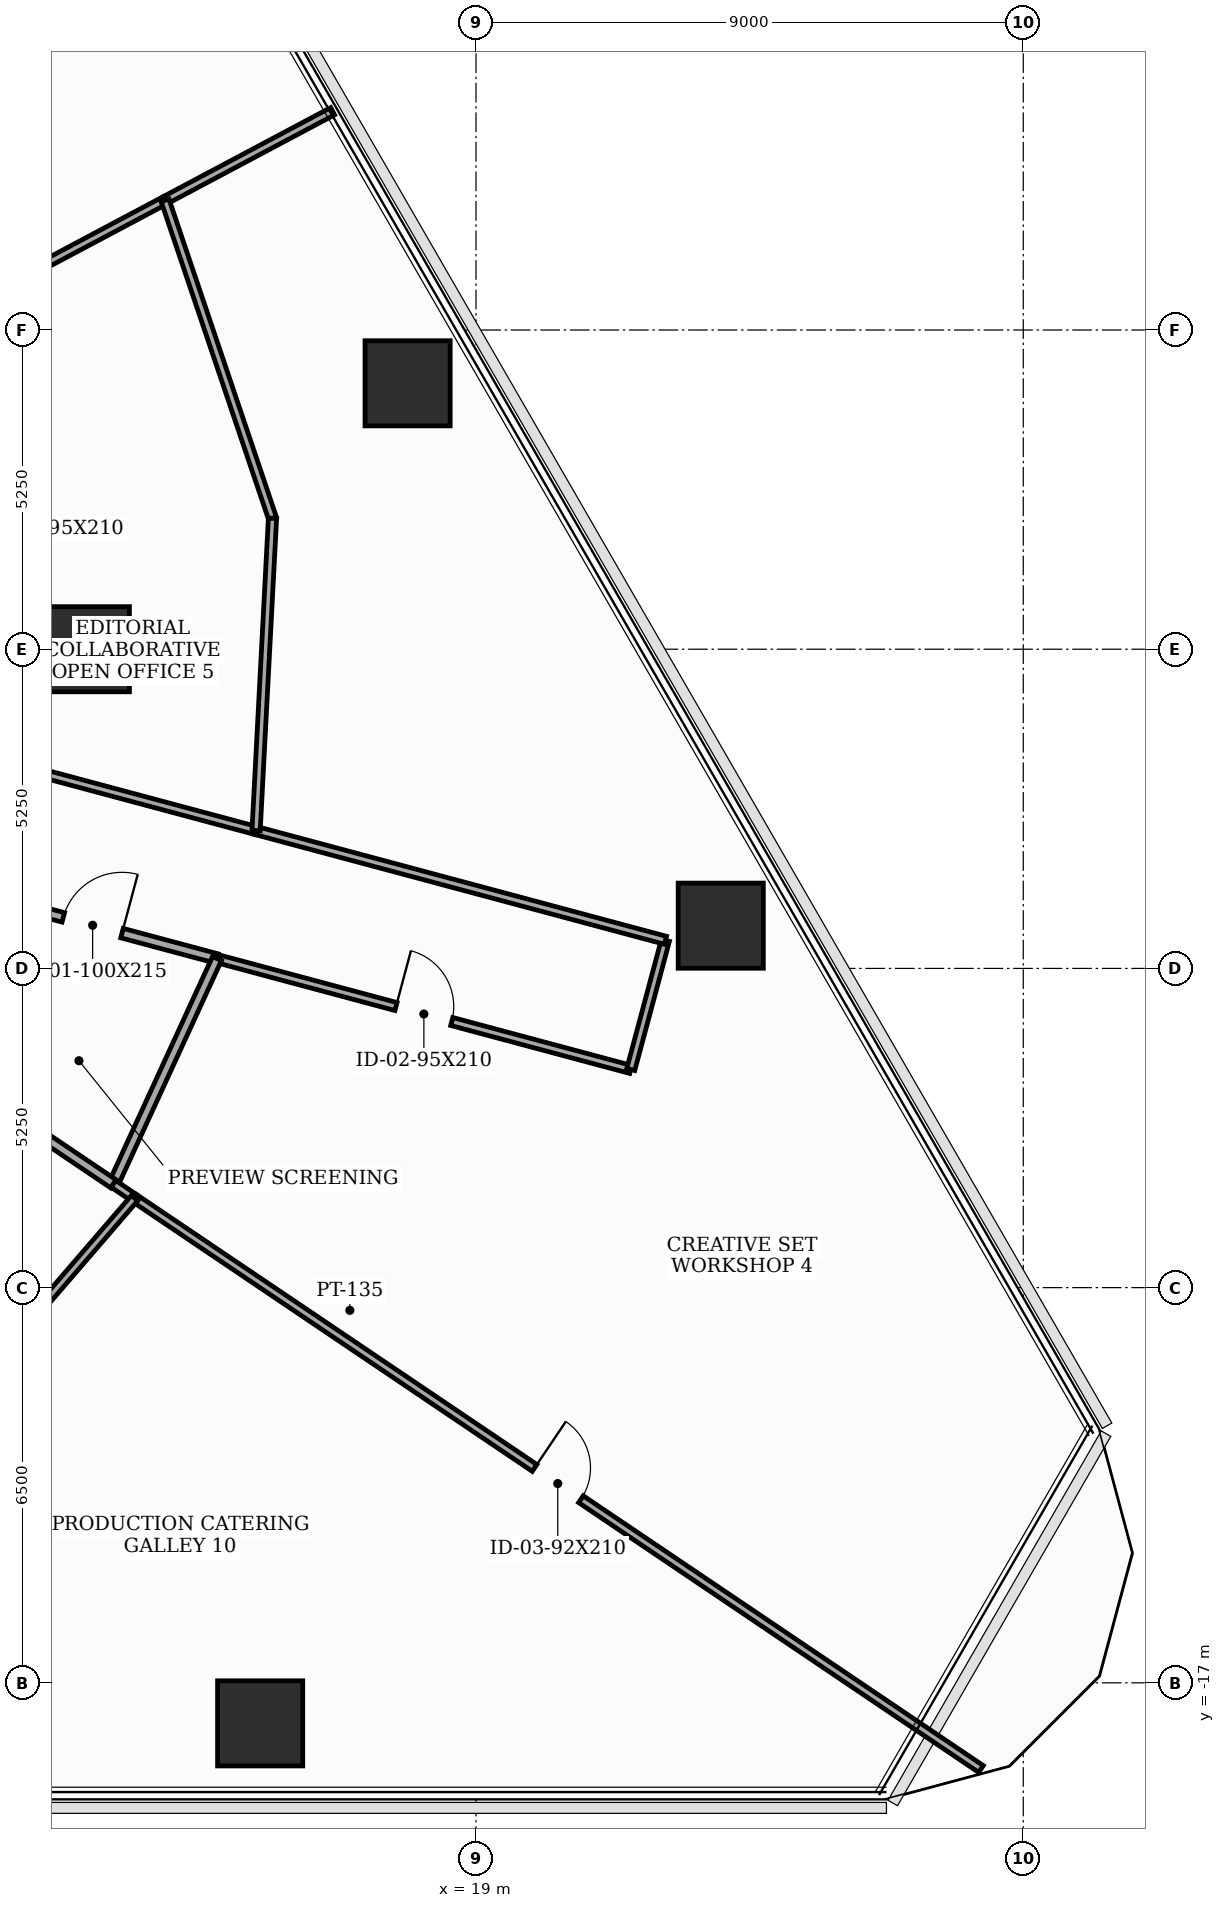
"""IFC4 building model, lengths in metres.
Left out: names, types, materials, properties, quantities, classifications, styles, units other than length and angle.
Written with IfcOpenShell. Run it as: python <this file> out.ifc"""

import sys

from ifc_helpers import new_model, si_unit, direction, frame, frame_2d, origin, origin_2d, place, context, subcontext, project, spatial, rectangle, extrude, element, fill, save


model = new_model("IFC4")
c1 = context("Model", 3, precision=1e-05, world=origin(), true_north=direction((0.0, 1.0)))
c2 = subcontext(c1, "Body", "Model", "MODEL_VIEW")
j1 = project(units=[si_unit("LENGTHUNIT", "METRE"), si_unit("PLANEANGLEUNIT", "RADIAN")], contexts=[c1])
p1 = place(None, origin())
s1 = spatial("IfcSite", under=j1, at=p1, CompositionType="ELEMENT")
p2 = place(p1, origin())
s2 = spatial("IfcBuilding", under=s1, at=p2, CompositionType="ELEMENT")
p3 = place(p2, frame((0.0, 0.0, 44.5)))
s3 = spatial("IfcBuildingStorey", under=s2, at=p3, CompositionType="ELEMENT", Elevation=44.5)
for number, where, z_axis, x_axis in (
    (1, (12.6, 0.0, 0.0), (0.0, 0.0, 1.0), (1.0, 0.0, 0.0)),
    (2, (15.45, -17.667, 0.0), (0.0, 0.0, 1.0), (1.0, 0.0, 0.0)),
    (3, (23.025, -4.547, 0.0), (0.0, 0.0, 1.0), (1.0, 0.0, 0.0)),
    (4, (17.875, 4.373, 0.0), (0.0, 0.0, 1.0), (1.0, 0.0, 0.0)),
):
    element("IfcColumn", number, at=place(p3, frame(where, z_axis=z_axis, x_axis=x_axis)), inside=s3, PredefinedType="COLUMN", context=c2, shape_type="SweptSolid", body=[
        extrude(rectangle(XDim=1.4, YDim=1.4, at=origin_2d()), origin(), (0.0, 0.0, 1.0), 3.7),
    ])
p4 = place(p3, frame((10.65, -3.992, 0.0), z_axis=(0.0, 0.0, 1.0), x_axis=(0.965925146235, -0.258821583086, 0.0)))
e5 = element("IfcWall", 5, at=p4, inside=s3, PredefinedType="PARTITIONING", context=c2, shape_type="SweptSolid", body=[
    extrude(rectangle(XDim=4.234, YDim=0.16, at=frame_2d((2.117, 0.0))), origin(), (0.0, 0.0, 1.0), 2.785),
])
p5 = place(p4, frame((1.617, 0.0, 0.0)))
e6 = element("IfcOpeningElement", 6, at=p5, cuts=e5, PredefinedType="OPENING", context=c2, shape_type="SweptSolid", body=[
    extrude(rectangle(XDim=1.0, YDim=2.15, at=frame_2d((0.5, 1.075))), frame((0.0, 0.09, 0.0), z_axis=(0.0, -1.0, 0.0), x_axis=(1.0, 0.0, 0.0)), (0.0, 0.0, 1.0), 0.18),
])
p6 = place(p3, frame((14.74, -5.088, 0.0), z_axis=(0.0, 0.0, 1.0), x_axis=(0.965895912523, -0.258930659002, 0.0)))
e7 = element("IfcWall", 7, at=p6, inside=s3, PredefinedType="PARTITIONING", context=c2, shape_type="SweptSolid", body=[
    extrude(rectangle(XDim=7.045, YDim=0.135, at=frame_2d((3.522, 0.0))), origin(), (0.0, 0.0, 1.0), 2.935),
])
p7 = place(p6, frame((3.048, 0.0, 0.0)))
e8 = element("IfcOpeningElement", 8, at=p7, cuts=e7, PredefinedType="OPENING", context=c2, shape_type="SweptSolid", body=[
    extrude(rectangle(XDim=0.95, YDim=2.1, at=frame_2d((0.475, 1.05))), frame((0.0, 0.077, 0.0), z_axis=(0.0, -1.0, 0.0), x_axis=(1.0, 0.0, 0.0)), (0.0, 0.0, 1.0), 0.155),
])
p8 = place(p3, frame((21.545, -6.912, 0.0), z_axis=(0.0, 0.0, 1.0), x_axis=(0.259105843213, 0.965848933329, 0.0)))
e9 = element("IfcWall", 9, at=p8, inside=s3, PredefinedType="PARTITIONING", context=c2, shape_type="SweptSolid", body=[
    extrude(rectangle(XDim=2.2, YDim=0.135, at=frame_2d((1.1, 0.0))), origin(), (0.0, 0.0, 1.0), 2.935),
])
p9 = place(p3, frame((22.115, -4.787, 0.0), z_axis=(0.0, 0.0, 1.0), x_axis=(-0.965912084765, 0.258870323726, 0.0)))
e10 = element("IfcWall", 10, at=p9, inside=s3, PredefinedType="PARTITIONING", context=c2, shape_type="SweptSolid", body=[
    extrude(rectangle(XDim=6.969, YDim=0.135, at=frame_2d((3.485, 0.0))), origin(), (0.0, 0.0, 1.0), 3.085),
])
p10 = place(p3, frame((15.383, -2.983, 0.0), z_axis=(0.0, 0.0, 1.0), x_axis=(-0.965947384406, 0.258738575706, 0.0)))
e11 = element("IfcWall", 11, at=p10, inside=s3, PredefinedType="PARTITIONING", context=c2, shape_type="SweptSolid", body=[
    extrude(rectangle(XDim=4.9, YDim=0.135, at=frame_2d((2.45, 0.0))), origin(), (0.0, 0.0, 1.0), 2.785),
])
p11 = place(p3, frame((13.886, 7.383, 0.0), z_axis=(0.0, 0.0, 1.0), x_axis=(0.88293033741, 0.469504014126, 0.0)))
e12 = element("IfcWall", 12, at=p11, inside=s3, PredefinedType="PARTITIONING", context=c2, shape_type="SweptSolid", body=[
    extrude(rectangle(XDim=3.122, YDim=0.135, at=frame_2d((1.561, 0.0))), origin(), (0.0, 0.0, 1.0), 2.935),
])
p12 = place(p3, frame((10.65, 5.663, 0.0), z_axis=(0.0, 0.0, 1.0), x_axis=(0.88302513666, 0.469325695041, 0.0)))
e13 = element("IfcWall", 13, at=p12, inside=s3, PredefinedType="PARTITIONING", context=c2, shape_type="SweptSolid", body=[
    extrude(rectangle(XDim=3.665, YDim=0.135, at=frame_2d((1.833, 0.0))), origin(), (0.0, 0.0, 1.0), 2.785),
])
p13 = place(p3, frame((13.038, -8.794, 0.0), z_axis=(0.0, 0.0, 1.0), x_axis=(0.417322480709, 0.908758464662, 0.0)))
e14 = element("IfcWall", 14, at=p13, inside=s3, PredefinedType="PARTITIONING", context=c2, shape_type="SweptSolid", body=[
    extrude(rectangle(XDim=4.078, YDim=0.16, at=frame_2d((2.039, 0.0))), origin(), (0.0, 0.0, 1.0), 3.5),
])
p14 = place(p3, frame((10.65, -7.184, 0.0), z_axis=(0.0, 0.0, 1.0), x_axis=(0.829196392101, -0.558957371654, 0.0)))
e15 = element("IfcWall", 15, at=p14, inside=s3, PredefinedType="PARTITIONING", context=c2, shape_type="SweptSolid", body=[
    extrude(rectangle(XDim=2.88, YDim=0.16, at=frame_2d((1.44, 0.0))), origin(), (0.0, 0.0, 1.0), 3.5),
])
p15 = place(p3, frame((13.886, 7.383, 0.0), z_axis=(0.0, 0.0, 1.0), x_axis=(0.320099223205, -0.947384023141, 0.0)))
e16 = element("IfcWall", 16, at=p15, inside=s3, PredefinedType="PARTITIONING", context=c2, shape_type="SweptSolid", body=[
    extrude(rectangle(XDim=5.521, YDim=0.135, at=frame_2d((2.76, 0.0))), origin(), (0.0, 0.0, 1.0), 2.685),
])
p16 = place(p3, frame((15.653, 2.153, 0.0), z_axis=(0.0, 0.0, 1.0), x_axis=(-0.05250152841, -0.998620843721, 0.0)))
e17 = element("IfcWall", 17, at=p16, inside=s3, PredefinedType="PARTITIONING", context=c2, shape_type="SweptSolid", body=[
    extrude(rectangle(XDim=5.143, YDim=0.135, at=frame_2d((2.572, 0.0))), origin(), (0.0, 0.0, 1.0), 2.685),
])
p17 = place(p3, frame((13.038, -8.794, 0.0), z_axis=(0.0, 0.0, 1.0), x_axis=(0.828163729679, -0.560486250361, 0.0)))
e18 = element("IfcWall", 18, at=p17, inside=s3, PredefinedType="PARTITIONING", context=c2, shape_type="SweptSolid", body=[
    extrude(rectangle(XDim=0.418, YDim=0.135, at=frame_2d((0.209, 0.0))), origin(), (0.0, 0.0, 1.0), 3.5),
])
p18 = place(p3, frame((13.384, -9.028, 0.0), z_axis=(0.0, 0.0, 1.0), x_axis=(0.829042972493, -0.55918489765, 0.0)))
e19 = element("IfcWall", 19, at=p18, inside=s3, PredefinedType="PARTITIONING", context=c2, shape_type="SweptSolid", body=[
    extrude(rectangle(XDim=16.791, YDim=0.135, at=frame_2d((8.396, 0.0))), origin(), (0.0, 0.0, 1.0), 2.935),
])
p19 = place(p18, frame((7.936, 0.0, 0.0)))
e20 = element("IfcOpeningElement", 20, at=p19, cuts=e19, PredefinedType="OPENING", context=c2, shape_type="SweptSolid", body=[
    extrude(rectangle(XDim=0.92, YDim=2.1, at=frame_2d((0.46, 1.05))), frame((0.0, 0.077, 0.0), z_axis=(0.0, -1.0, 0.0), x_axis=(1.0, 0.0, 0.0)), (0.0, 0.0, 1.0), 0.155),
])
p20 = place(p3, frame((10.628, -12.226, 0.0), z_axis=(0.0, 0.0, 1.0), x_axis=(0.652832083446, 0.757502654004, 0.0)))
e21 = element("IfcWall", 21, at=p20, inside=s3, PredefinedType="PARTITIONING", context=c2, shape_type="SweptSolid", body=[
    extrude(rectangle(XDim=4.222, YDim=0.135, at=frame_2d((2.111, 0.0))), origin(), (0.0, 0.0, 1.0), 3.5),
])
p21 = place(p5, origin())
e22 = element("IfcDoor", 22, at=p21, inside=s3, OperationType="SINGLE_SWING_RIGHT", PredefinedType="DOOR", context=c2, shape_type="SweptSolid", body=[
    extrude(rectangle(XDim=1.0, YDim=2.15, at=frame_2d((0.5, 1.075))), frame((0.0, 0.025, 0.0), z_axis=(0.0, -1.0, 0.0), x_axis=(1.0, 0.0, 0.0)), (0.0, 0.0, 1.0), 0.05),
])
fill(e6, e22)
p22 = place(p7, origin())
e23 = element("IfcDoor", 23, at=p22, inside=s3, OperationType="SINGLE_SWING_LEFT", PredefinedType="DOOR", context=c2, shape_type="SweptSolid", body=[
    extrude(rectangle(XDim=0.95, YDim=2.1, at=frame_2d((0.475, 1.05))), frame((0.0, 0.025, 0.0), z_axis=(0.0, -1.0, 0.0), x_axis=(1.0, 0.0, 0.0)), (0.0, 0.0, 1.0), 0.05),
])
fill(e8, e23)
p23 = place(p19, origin())
e24 = element("IfcDoor", 24, at=p23, inside=s3, OperationType="SINGLE_SWING_LEFT", PredefinedType="DOOR", context=c2, shape_type="SweptSolid", body=[
    extrude(rectangle(XDim=0.92, YDim=2.1, at=frame_2d((0.46, 1.05))), frame((0.0, 0.025, 0.0), z_axis=(0.0, -1.0, 0.0), x_axis=(1.0, 0.0, 0.0)), (0.0, 0.0, 1.0), 0.05),
])
fill(e20, e24)
save(model, sys.argv[1])
